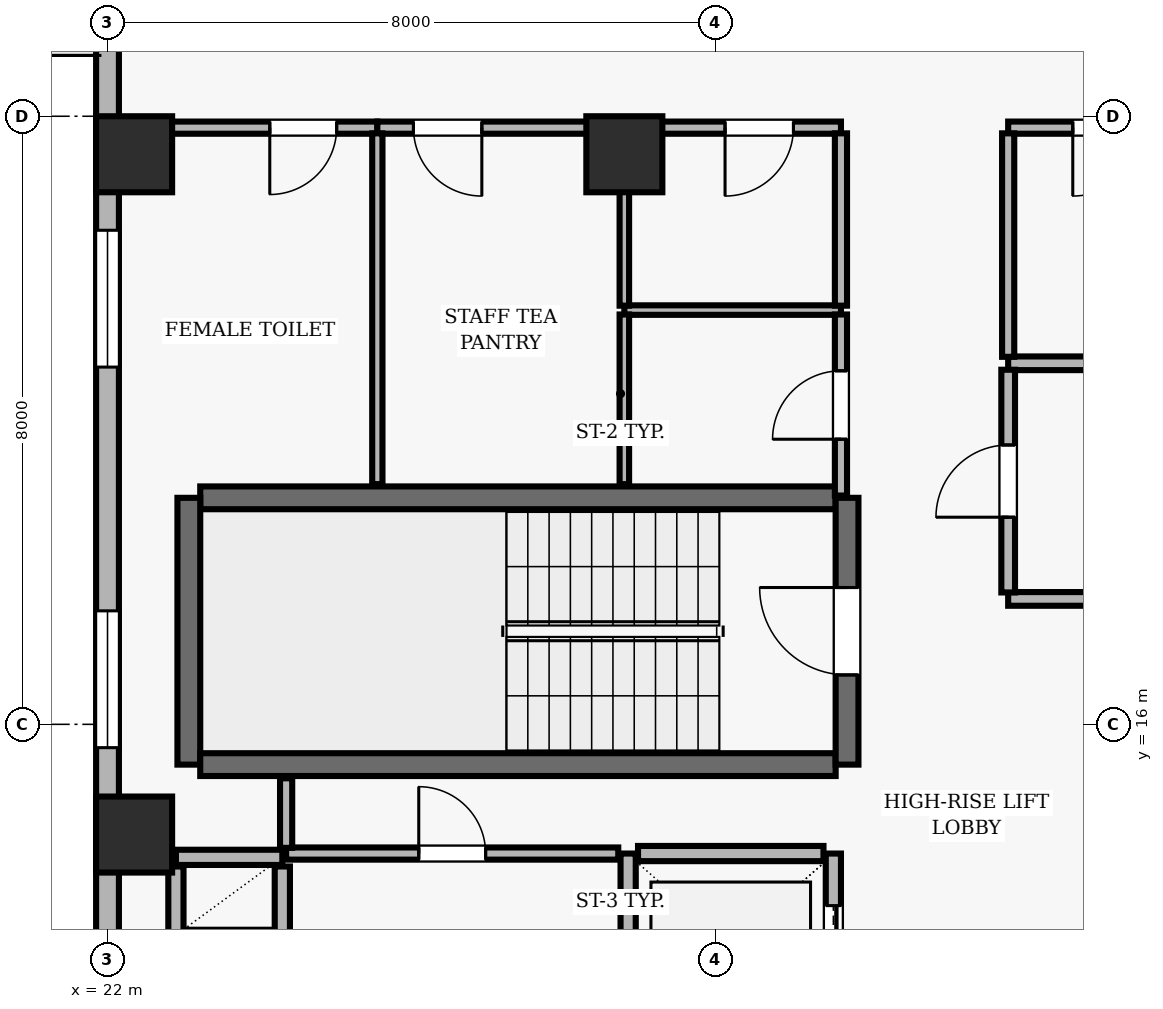
"""IFC4 building model, lengths in metres.
Left out: names, types, materials, properties, quantities, classifications, styles, units other than length and angle.
Written with IfcOpenShell. Run it as: python <this file> out.ifc"""

import sys

from ifc_helpers import new_model, si_unit, direction, frame, frame_2d, origin, origin_2d, place, context, subcontext, project, spatial, rectangle, extrude, element, fill, save


model = new_model("IFC4")
c1 = context("Model", 3, precision=1e-05, world=origin(), true_north=direction((0.0, 1.0)))
c2 = subcontext(c1, "Body", "Model", "MODEL_VIEW")
j1 = project(units=[si_unit("LENGTHUNIT", "METRE"), si_unit("PLANEANGLEUNIT", "RADIAN")], contexts=[c1])
p1 = place(None, origin())
s1 = spatial("IfcSite", under=j1, at=p1, CompositionType="ELEMENT")
p2 = place(p1, origin())
s2 = spatial("IfcBuilding", under=s1, at=p2, CompositionType="ELEMENT")
p3 = place(p2, frame((0.0, 0.0, 222.6)))
s3 = spatial("IfcBuildingStorey", under=s2, at=p3, CompositionType="ELEMENT", Elevation=222.6)
for number, where, z_axis, x_axis in (
    (1, (22.35, 14.55, 0.0), (0.0, 0.0, 1.0), (1.0, 0.0, 0.0)),
    (2, (22.35, 23.5, 0.0), (0.0, 0.0, 1.0), (1.0, 0.0, 0.0)),
    (3, (28.8, 23.5, 0.0), (0.0, 0.0, 1.0), (1.0, 0.0, 0.0)),
):
    element("IfcColumn", number, at=place(p3, frame(where, z_axis=z_axis, x_axis=x_axis)), inside=s3, PredefinedType="COLUMN", context=c2, shape_type="SweptSolid", body=[
        extrude(rectangle(XDim=1.0, YDim=1.0, at=origin_2d()), origin(), (0.0, 0.0, 1.0), 3.9),
    ])
p4 = place(p3, frame((22.0, 40.7, 0.0), z_axis=(0.0, 0.0, 1.0), x_axis=(0.0, -1.0, 0.0)))
e4 = element("IfcWall", 4, at=p4, inside=s3, PredefinedType="SOLIDWALL", context=c2, shape_type="SweptSolid", body=[
    extrude(rectangle(XDim=38.2, YDim=0.3, at=frame_2d((19.1, 0.0))), origin(), (0.0, 0.0, 1.0), 3.69),
])
p5 = place(p4, frame((7.8, 0.0, 0.0)))
e5 = element("IfcOpeningElement", 5, at=p5, cuts=e4, PredefinedType="OPENING", context=c2, shape_type="SweptSolid", body=[
    extrude(rectangle(XDim=1.0, YDim=2.2, at=frame_2d((0.5, 1.1))), frame((0.0, 0.16, 0.0), z_axis=(0.0, -1.0, 0.0), x_axis=(1.0, 0.0, 0.0)), (0.0, 0.0, 1.0), 0.32),
])
p6 = place(p4, frame((2.279, 0.0, 0.9)))
e6 = element("IfcOpeningElement", 6, at=p6, cuts=e4, PredefinedType="OPENING", context=c2, shape_type="SweptSolid", body=[
    extrude(rectangle(XDim=1.8, YDim=1.8, at=frame_2d((0.9, 0.9))), frame((0.0, 0.16, 0.0), z_axis=(0.0, -1.0, 0.0), x_axis=(1.0, 0.0, 0.0)), (0.0, 0.0, 1.0), 0.32),
])
p7 = place(p4, frame((12.293, 0.0, 0.9)))
e7 = element("IfcOpeningElement", 7, at=p7, cuts=e4, PredefinedType="OPENING", context=c2, shape_type="SweptSolid", body=[
    extrude(rectangle(XDim=1.8, YDim=1.8, at=frame_2d((0.9, 0.9))), frame((0.0, 0.16, 0.0), z_axis=(0.0, -1.0, 0.0), x_axis=(1.0, 0.0, 0.0)), (0.0, 0.0, 1.0), 0.32),
])
p8 = place(p4, frame((18.2, 0.0, 0.9)))
e8 = element("IfcOpeningElement", 8, at=p8, cuts=e4, PredefinedType="OPENING", context=c2, shape_type="SweptSolid", body=[
    extrude(rectangle(XDim=1.8, YDim=1.8, at=frame_2d((0.9, 0.9))), frame((0.0, 0.16, 0.0), z_axis=(0.0, -1.0, 0.0), x_axis=(1.0, 0.0, 0.0)), (0.0, 0.0, 1.0), 0.32),
])
p9 = place(p4, frame((23.207, 0.0, 0.9)))
e9 = element("IfcOpeningElement", 9, at=p9, cuts=e4, PredefinedType="OPENING", context=c2, shape_type="SweptSolid", body=[
    extrude(rectangle(XDim=1.8, YDim=1.8, at=frame_2d((0.9, 0.9))), frame((0.0, 0.16, 0.0), z_axis=(0.0, -1.0, 0.0), x_axis=(1.0, 0.0, 0.0)), (0.0, 0.0, 1.0), 0.32),
])
p10 = place(p4, frame((29.114, 0.0, 0.9)))
e10 = element("IfcOpeningElement", 10, at=p10, cuts=e4, PredefinedType="OPENING", context=c2, shape_type="SweptSolid", body=[
    extrude(rectangle(XDim=1.8, YDim=1.8, at=frame_2d((0.9, 0.9))), frame((0.0, 0.16, 0.0), z_axis=(0.0, -1.0, 0.0), x_axis=(1.0, 0.0, 0.0)), (0.0, 0.0, 1.0), 0.32),
])
p11 = place(p3, frame((31.58, 18.98, 0.0), z_axis=(0.0, 0.0, 1.0), x_axis=(-1.0, 0.0, 0.0)))
e11 = element("IfcWall", 11, at=p11, inside=s3, PredefinedType="SHEAR", context=c2, shape_type="SweptSolid", body=[
    extrude(rectangle(XDim=8.36, YDim=0.3, at=frame_2d((4.18, 0.0))), origin(), (0.0, 0.0, 1.0), 3.69),
])
p12 = place(p3, frame((23.07, 18.98, 0.0), z_axis=(0.0, 0.0, 1.0), x_axis=(0.0, -1.0, 0.0)))
e12 = element("IfcWall", 12, at=p12, inside=s3, PredefinedType="SHEAR", context=c2, shape_type="SweptSolid", body=[
    extrude(rectangle(XDim=3.51, YDim=0.3, at=frame_2d((1.755, 0.0))), origin(), (0.0, 0.0, 1.0), 3.69),
])
p13 = place(p3, frame((23.22, 15.47, 0.0), z_axis=(0.0, 0.0, 1.0), x_axis=(1.0, 0.0, 0.0)))
e13 = element("IfcWall", 13, at=p13, inside=s3, PredefinedType="SHEAR", context=c2, shape_type="SweptSolid", body=[
    extrude(rectangle(XDim=8.36, YDim=0.3, at=frame_2d((4.18, 0.0))), origin(), (0.0, 0.0, 1.0), 3.69),
])
p14 = place(p3, frame((31.73, 15.47, 0.0), z_axis=(0.0, 0.0, 1.0), x_axis=(0.0, 1.0, 0.0)))
e14 = element("IfcWall", 14, at=p14, inside=s3, PredefinedType="SHEAR", context=c2, shape_type="SweptSolid", body=[
    extrude(rectangle(XDim=3.51, YDim=0.3, at=frame_2d((1.755, 0.0))), origin(), (0.0, 0.0, 1.0), 3.69),
])
p15 = place(p14, frame((1.18, 0.0, 0.0)))
e15 = element("IfcOpeningElement", 15, at=p15, cuts=e14, PredefinedType="OPENING", context=c2, shape_type="SweptSolid", body=[
    extrude(rectangle(XDim=1.15, YDim=2.15, at=frame_2d((0.575, 1.075))), frame((0.0, 0.16, 0.0), z_axis=(0.0, -1.0, 0.0), x_axis=(1.0, 0.0, 0.0)), (0.0, 0.0, 1.0), 0.32),
])
p16 = place(p3, frame((28.85, 14.3, 0.0), z_axis=(0.0, 0.0, 1.0), x_axis=(0.0, -1.0, 0.0)))
e16 = element("IfcWall", 16, at=p16, inside=s3, PredefinedType="SOLIDWALL", context=c2, shape_type="SweptSolid", body=[
    extrude(rectangle(XDim=2.37, YDim=0.2, at=frame_2d((1.185, 0.0))), origin(), (0.0, 0.0, 1.0), 3.69),
])
p17 = place(p3, frame((31.55, 11.93, 0.0), z_axis=(0.0, 0.0, 1.0), x_axis=(0.0, 1.0, 0.0)))
e17 = element("IfcWall", 17, at=p17, inside=s3, PredefinedType="SOLIDWALL", context=c2, shape_type="SweptSolid", body=[
    extrude(rectangle(XDim=2.37, YDim=0.2, at=frame_2d((1.185, 0.0))), origin(), (0.0, 0.0, 1.0), 3.69),
])
p18 = place(p17, frame((0.685, 0.0, 0.0)))
e18 = element("IfcOpeningElement", 18, at=p18, cuts=e17, PredefinedType="OPENING", context=c2, shape_type="SweptSolid", body=[
    extrude(rectangle(XDim=1.0, YDim=2.1, at=frame_2d((0.5, 1.05))), frame((0.0, 0.11, 0.0), z_axis=(0.0, -1.0, 0.0), x_axis=(1.0, 0.0, 0.0)), (0.0, 0.0, 1.0), 0.22),
])
p19 = place(p3, frame((31.42, 14.3, 0.0), z_axis=(0.0, 0.0, 1.0), x_axis=(-1.0, 0.0, 0.0)))
e19 = element("IfcWall", 19, at=p19, inside=s3, PredefinedType="SOLIDWALL", context=c2, shape_type="SweptSolid", body=[
    extrude(rectangle(XDim=2.44, YDim=0.2, at=frame_2d((1.22, 0.0))), origin(), (0.0, 0.0, 1.0), 3.69),
])
p20 = place(p3, frame((22.9, 14.25, 0.0), z_axis=(0.0, 0.0, 1.0), x_axis=(1.0, 0.0, 0.0)))
e20 = element("IfcWall", 20, at=p20, inside=s3, PredefinedType="SOLIDWALL", context=c2, shape_type="SweptSolid", body=[
    extrude(rectangle(XDim=1.4, YDim=0.2, at=frame_2d((0.7, 0.0))), origin(), (0.0, 0.0, 1.0), 3.69),
])
for number, where, z_axis, x_axis in (
    (21, (24.3, 12.3, 0.0), (0.0, 0.0, 1.0), (0.0, 1.0, 0.0)),
    (22, (22.9, 12.3, 0.0), (0.0, 0.0, 1.0), (0.0, 1.0, 0.0)),
):
    element("IfcWall", number, at=place(p3, frame(where, z_axis=z_axis, x_axis=x_axis)), inside=s3, PredefinedType="SOLIDWALL", context=c2, shape_type="SweptSolid", body=[
        extrude(rectangle(XDim=1.83, YDim=0.2, at=frame_2d((0.915, 0.0))), origin(), (0.0, 0.0, 1.0), 3.69),
    ])
p21 = place(p3, frame((24.35, 14.3, 0.0), z_axis=(0.0, 0.0, 1.0), x_axis=(1.0, 0.0, 0.0)))
e23 = element("IfcWall", 23, at=p21, inside=s3, PredefinedType="PARTITIONING", context=c2, shape_type="SweptSolid", body=[
    extrude(rectangle(XDim=4.37, YDim=0.16, at=frame_2d((2.185, 0.0))), origin(), (0.0, 0.0, 1.0), 3.69),
])
p22 = place(p21, frame((1.745, 0.0, 0.0)))
e24 = element("IfcOpeningElement", 24, at=p22, cuts=e23, PredefinedType="OPENING", context=c2, shape_type="SweptSolid", body=[
    extrude(rectangle(XDim=0.88, YDim=2.1, at=frame_2d((0.44, 1.05))), frame((0.0, 0.09, 0.0), z_axis=(0.0, -1.0, 0.0), x_axis=(1.0, 0.0, 0.0)), (0.0, 0.0, 1.0), 0.18),
])
p23 = place(p3, frame((25.55, 23.85, 0.0), z_axis=(0.0, 0.0, 1.0), x_axis=(-1.0, 0.0, 0.0)))
e25 = element("IfcWall", 25, at=p23, inside=s3, PredefinedType="PARTITIONING", context=c2, shape_type="SweptSolid", body=[
    extrude(rectangle(XDim=3.35, YDim=0.16, at=frame_2d((1.675, 0.0))), origin(), (0.0, 0.0, 1.0), 3.139),
])
p24 = place(p23, frame((0.535, 0.0, 0.0)))
e26 = element("IfcOpeningElement", 26, at=p24, cuts=e25, PredefinedType="OPENING", context=c2, shape_type="SweptSolid", body=[
    extrude(rectangle(XDim=0.88, YDim=2.1, at=frame_2d((0.44, 1.05))), frame((0.0, 0.09, 0.0), z_axis=(0.0, -1.0, 0.0), x_axis=(1.0, 0.0, 0.0)), (0.0, 0.0, 1.0), 0.18),
])
p25 = place(p3, frame((28.8, 23.85, 0.0), z_axis=(0.0, 0.0, 1.0), x_axis=(-1.0, 0.0, 0.0)))
e27 = element("IfcWall", 27, at=p25, inside=s3, PredefinedType="PARTITIONING", context=c2, shape_type="SweptSolid", body=[
    extrude(rectangle(XDim=3.25, YDim=0.16, at=frame_2d((1.625, 0.0))), origin(), (0.0, 0.0, 1.0), 3.139),
])
p26 = place(p25, frame((1.875, 0.0, 0.0)))
e28 = element("IfcOpeningElement", 28, at=p26, cuts=e27, PredefinedType="OPENING", context=c2, shape_type="SweptSolid", body=[
    extrude(rectangle(XDim=0.9, YDim=2.1, at=frame_2d((0.45, 1.05))), frame((0.0, 0.09, 0.0), z_axis=(0.0, -1.0, 0.0), x_axis=(1.0, 0.0, 0.0)), (0.0, 0.0, 1.0), 0.18),
])
p27 = place(p3, frame((31.65, 21.45, 0.0), z_axis=(0.0, 0.0, 1.0), x_axis=(-1.0, 0.0, 0.0)))
e29 = element("IfcWall", 29, at=p27, inside=s3, PredefinedType="PARTITIONING", context=c2, shape_type="SweptSolid", body=[
    extrude(rectangle(XDim=2.85, YDim=0.125, at=frame_2d((1.425, 0.0))), origin(), (0.0, 0.0, 1.0), 3.69),
])
p28 = place(p3, frame((31.65, 23.85, 0.0), z_axis=(0.0, 0.0, 1.0), x_axis=(-1.0, 0.0, 0.0)))
e30 = element("IfcWall", 30, at=p28, inside=s3, PredefinedType="PARTITIONING", context=c2, shape_type="SweptSolid", body=[
    extrude(rectangle(XDim=2.85, YDim=0.16, at=frame_2d((1.425, 0.0))), origin(), (0.0, 0.0, 1.0), 3.139),
])
p29 = place(p28, frame((0.625, 0.0, 0.0)))
e31 = element("IfcOpeningElement", 31, at=p29, cuts=e30, PredefinedType="OPENING", context=c2, shape_type="SweptSolid", body=[
    extrude(rectangle(XDim=0.9, YDim=2.1, at=frame_2d((0.45, 1.05))), frame((0.0, 0.09, 0.0), z_axis=(0.0, -1.0, 0.0), x_axis=(1.0, 0.0, 0.0)), (0.0, 0.0, 1.0), 0.18),
])
p30 = place(p3, frame((33.85, 17.65, 0.0), z_axis=(0.0, 0.0, 1.0), x_axis=(1.0, 0.0, 0.0)))
e32 = element("IfcWall", 32, at=p30, inside=s3, PredefinedType="PARTITIONING", context=c2, shape_type="SweptSolid", body=[
    extrude(rectangle(XDim=1.3, YDim=0.18, at=frame_2d((0.65, 0.0))), origin(), (0.0, 0.0, 1.0), 3.69),
])
p31 = place(p3, frame((37.85, 20.75, 0.0), z_axis=(0.0, 0.0, 1.0), x_axis=(-1.0, 0.0, 0.0)))
e33 = element("IfcWall", 33, at=p31, inside=s3, PredefinedType="PARTITIONING", context=c2, shape_type="SweptSolid", body=[
    extrude(rectangle(XDim=4.0, YDim=0.18, at=frame_2d((2.0, 0.0))), origin(), (0.0, 0.0, 1.0), 3.69),
])
p32 = place(p3, frame((37.85, 23.85, 0.0), z_axis=(0.0, 0.0, 1.0), x_axis=(-1.0, 0.0, 0.0)))
e34 = element("IfcWall", 34, at=p32, inside=s3, PredefinedType="PARTITIONING", context=c2, shape_type="SweptSolid", body=[
    extrude(rectangle(XDim=4.0, YDim=0.16, at=frame_2d((2.0, 0.0))), origin(), (0.0, 0.0, 1.0), 3.139),
])
p33 = place(p32, frame((2.25, 0.0, 0.0)))
e35 = element("IfcOpeningElement", 35, at=p33, cuts=e34, PredefinedType="OPENING", context=c2, shape_type="SweptSolid", body=[
    extrude(rectangle(XDim=0.9, YDim=2.1, at=frame_2d((0.45, 1.05))), frame((0.0, 0.09, 0.0), z_axis=(0.0, -1.0, 0.0), x_axis=(1.0, 0.0, 0.0)), (0.0, 0.0, 1.0), 0.18),
])
p34 = place(p3, frame((24.35, 15.29, 0.0), z_axis=(0.0, 0.0, 1.0), x_axis=(0.0, -1.0, 0.0)))
e36 = element("IfcWall", 36, at=p34, inside=s3, PredefinedType="PARTITIONING", context=c2, shape_type="SweptSolid", body=[
    extrude(rectangle(XDim=0.915, YDim=0.16, at=frame_2d((0.458, 0.0))), origin(), (0.0, 0.0, 1.0), 3.69),
])
p35 = place(p3, frame((25.55, 19.16, 0.0), z_axis=(0.0, 0.0, 1.0), x_axis=(0.0, 1.0, 0.0)))
e37 = element("IfcWall", 37, at=p35, inside=s3, PredefinedType="PARTITIONING", context=c2, shape_type="SweptSolid", body=[
    extrude(rectangle(XDim=4.615, YDim=0.135, at=frame_2d((2.308, 0.0))), origin(), (0.0, 0.0, 1.0), 3.69),
])
p36 = place(p3, frame((28.8, 21.392, 0.0), z_axis=(0.0, 0.0, 1.0), x_axis=(0.0, -1.0, 0.0)))
e38 = element("IfcWall", 38, at=p36, inside=s3, PredefinedType="PARTITIONING", context=c2, shape_type="SweptSolid", body=[
    extrude(rectangle(XDim=2.232, YDim=0.125, at=frame_2d((1.116, 0.0))), origin(), (0.0, 0.0, 1.0), 3.69),
])
p37 = place(p3, frame((28.8, 23.775, 0.0), z_axis=(0.0, 0.0, 1.0), x_axis=(0.0, -1.0, 0.0)))
e39 = element("IfcWall", 39, at=p37, inside=s3, PredefinedType="PARTITIONING", context=c2, shape_type="SweptSolid", body=[
    extrude(rectangle(XDim=2.267, YDim=0.125, at=frame_2d((1.133, 0.0))), origin(), (0.0, 0.0, 1.0), 3.69),
])
p38 = place(p3, frame((31.65, 19.01, 0.0), z_axis=(0.0, 0.0, 1.0), x_axis=(0.0, 1.0, 0.0)))
e40 = element("IfcWall", 40, at=p38, inside=s3, PredefinedType="PARTITIONING", context=c2, shape_type="SweptSolid", body=[
    extrude(rectangle(XDim=2.382, YDim=0.16, at=frame_2d((1.191, 0.0))), origin(), (0.0, 0.0, 1.0), 3.69),
])
p39 = place(p38, frame((0.741, 0.0, 0.0)))
e41 = element("IfcOpeningElement", 41, at=p39, cuts=e40, PredefinedType="OPENING", context=c2, shape_type="SweptSolid", body=[
    extrude(rectangle(XDim=0.9, YDim=2.1, at=frame_2d((0.45, 1.05))), frame((0.0, 0.09, 0.0), z_axis=(0.0, -1.0, 0.0), x_axis=(1.0, 0.0, 0.0)), (0.0, 0.0, 1.0), 0.18),
])
p40 = place(p3, frame((31.65, 23.775, 0.0), z_axis=(0.0, 0.0, 1.0), x_axis=(0.0, -1.0, 0.0)))
e42 = element("IfcWall", 42, at=p40, inside=s3, PredefinedType="PARTITIONING", context=c2, shape_type="SweptSolid", body=[
    extrude(rectangle(XDim=2.267, YDim=0.16, at=frame_2d((1.133, 0.0))), origin(), (0.0, 0.0, 1.0), 3.69),
])
p41 = place(p3, frame((33.85, 17.735, 0.0), z_axis=(0.0, 0.0, 1.0), x_axis=(0.0, 1.0, 0.0)))
e43 = element("IfcWall", 43, at=p41, inside=s3, PredefinedType="PARTITIONING", context=c2, shape_type="SweptSolid", body=[
    extrude(rectangle(XDim=2.93, YDim=0.18, at=frame_2d((1.465, 0.0))), origin(), (0.0, 0.0, 1.0), 3.69),
])
p42 = place(p41, frame((0.99, 0.0, 0.0)))
e44 = element("IfcOpeningElement", 44, at=p42, cuts=e43, PredefinedType="OPENING", context=c2, shape_type="SweptSolid", body=[
    extrude(rectangle(XDim=0.95, YDim=2.1, at=frame_2d((0.475, 1.05))), frame((0.0, 0.1, 0.0), z_axis=(0.0, -1.0, 0.0), x_axis=(1.0, 0.0, 0.0)), (0.0, 0.0, 1.0), 0.2),
])
p43 = place(p3, frame((33.85, 20.835, 0.0), z_axis=(0.0, 0.0, 1.0), x_axis=(0.0, 1.0, 0.0)))
e45 = element("IfcWall", 45, at=p43, inside=s3, PredefinedType="PARTITIONING", context=c2, shape_type="SweptSolid", body=[
    extrude(rectangle(XDim=2.94, YDim=0.16, at=frame_2d((1.47, 0.0))), origin(), (0.0, 0.0, 1.0), 3.69),
])
p44 = place(p8, origin())
e46 = element("IfcWindow", 46, at=p44, inside=s3, PartitioningType="SINGLE_PANEL", PredefinedType="WINDOW", context=c2, shape_type="SweptSolid", body=[
    extrude(rectangle(XDim=1.8, YDim=1.8, at=frame_2d((0.9, 0.9))), frame((0.0, 0.03, 0.0), z_axis=(0.0, -1.0, 0.0), x_axis=(1.0, 0.0, 0.0)), (0.0, 0.0, 1.0), 0.06),
])
fill(e8, e46)
p45 = place(p9, origin())
e47 = element("IfcWindow", 47, at=p45, inside=s3, PartitioningType="SINGLE_PANEL", PredefinedType="WINDOW", context=c2, shape_type="SweptSolid", body=[
    extrude(rectangle(XDim=1.8, YDim=1.8, at=frame_2d((0.9, 0.9))), frame((0.0, 0.03, 0.0), z_axis=(0.0, -1.0, 0.0), x_axis=(1.0, 0.0, 0.0)), (0.0, 0.0, 1.0), 0.06),
])
fill(e9, e47)
p46 = place(p15, origin())
e48 = element("IfcDoor", 48, at=p46, inside=s3, OperationType="SINGLE_SWING_RIGHT", PredefinedType="DOOR", context=c2, shape_type="SweptSolid", body=[
    extrude(rectangle(XDim=1.15, YDim=2.15, at=frame_2d((0.575, 1.075))), frame((0.0, 0.025, 0.0), z_axis=(0.0, -1.0, 0.0), x_axis=(1.0, 0.0, 0.0)), (0.0, 0.0, 1.0), 0.05),
])
fill(e15, e48)
p47 = place(p18, origin())
e49 = element("IfcDoor", 49, at=p47, inside=s3, OperationType="DOUBLE_DOOR_SLIDING", PredefinedType="DOOR", context=c2, shape_type="SweptSolid", body=[
    extrude(rectangle(XDim=1.0, YDim=2.1, at=frame_2d((0.5, 1.05))), frame((0.0, 0.025, 0.0), z_axis=(0.0, -1.0, 0.0), x_axis=(1.0, 0.0, 0.0)), (0.0, 0.0, 1.0), 0.05),
])
fill(e18, e49)
p48 = place(p42, origin())
e50 = element("IfcDoor", 50, at=p48, inside=s3, OperationType="SINGLE_SWING_LEFT", PredefinedType="DOOR", context=c2, shape_type="SweptSolid", body=[
    extrude(rectangle(XDim=0.95, YDim=2.1, at=frame_2d((0.475, 1.05))), frame((0.0, 0.025, 0.0), z_axis=(0.0, -1.0, 0.0), x_axis=(1.0, 0.0, 0.0)), (0.0, 0.0, 1.0), 0.05),
])
fill(e44, e50)
p49 = place(p33, origin())
e51 = element("IfcDoor", 51, at=p49, inside=s3, OperationType="SINGLE_SWING_RIGHT", PredefinedType="DOOR", context=c2, shape_type="SweptSolid", body=[
    extrude(rectangle(XDim=0.9, YDim=2.1, at=frame_2d((0.45, 1.05))), frame((0.0, 0.025, 0.0), z_axis=(0.0, -1.0, 0.0), x_axis=(1.0, 0.0, 0.0)), (0.0, 0.0, 1.0), 0.05),
])
fill(e35, e51)
p50 = place(p39, origin())
e52 = element("IfcDoor", 52, at=p50, inside=s3, OperationType="SINGLE_SWING_LEFT", PredefinedType="DOOR", context=c2, shape_type="SweptSolid", body=[
    extrude(rectangle(XDim=0.9, YDim=2.1, at=frame_2d((0.45, 1.05))), frame((0.0, 0.025, 0.0), z_axis=(0.0, -1.0, 0.0), x_axis=(1.0, 0.0, 0.0)), (0.0, 0.0, 1.0), 0.05),
])
fill(e41, e52)
p51 = place(p29, origin())
e53 = element("IfcDoor", 53, at=p51, inside=s3, OperationType="SINGLE_SWING_RIGHT", PredefinedType="DOOR", context=c2, shape_type="SweptSolid", body=[
    extrude(rectangle(XDim=0.9, YDim=2.1, at=frame_2d((0.45, 1.05))), frame((0.0, 0.025, 0.0), z_axis=(0.0, -1.0, 0.0), x_axis=(1.0, 0.0, 0.0)), (0.0, 0.0, 1.0), 0.05),
])
fill(e31, e53)
p52 = place(p22, origin())
e54 = element("IfcDoor", 54, at=p52, inside=s3, OperationType="SINGLE_SWING_LEFT", PredefinedType="DOOR", context=c2, shape_type="SweptSolid", body=[
    extrude(rectangle(XDim=0.88, YDim=2.1, at=frame_2d((0.44, 1.05))), frame((0.0, 0.025, 0.0), z_axis=(0.0, -1.0, 0.0), x_axis=(1.0, 0.0, 0.0)), (0.0, 0.0, 1.0), 0.05),
])
fill(e24, e54)
p53 = place(p24, origin())
e55 = element("IfcDoor", 55, at=p53, inside=s3, OperationType="SINGLE_SWING_RIGHT", PredefinedType="DOOR", context=c2, shape_type="SweptSolid", body=[
    extrude(rectangle(XDim=0.88, YDim=2.1, at=frame_2d((0.44, 1.05))), frame((0.0, 0.025, 0.0), z_axis=(0.0, -1.0, 0.0), x_axis=(1.0, 0.0, 0.0)), (0.0, 0.0, 1.0), 0.05),
])
fill(e26, e55)
p54 = place(p26, origin())
e56 = element("IfcDoor", 56, at=p54, inside=s3, OperationType="SINGLE_SWING_LEFT", PredefinedType="DOOR", context=c2, shape_type="SweptSolid", body=[
    extrude(rectangle(XDim=0.9, YDim=2.1, at=frame_2d((0.45, 1.05))), frame((0.0, 0.025, 0.0), z_axis=(0.0, -1.0, 0.0), x_axis=(1.0, 0.0, 0.0)), (0.0, 0.0, 1.0), 0.05),
])
fill(e28, e56)
save(model, sys.argv[1])
